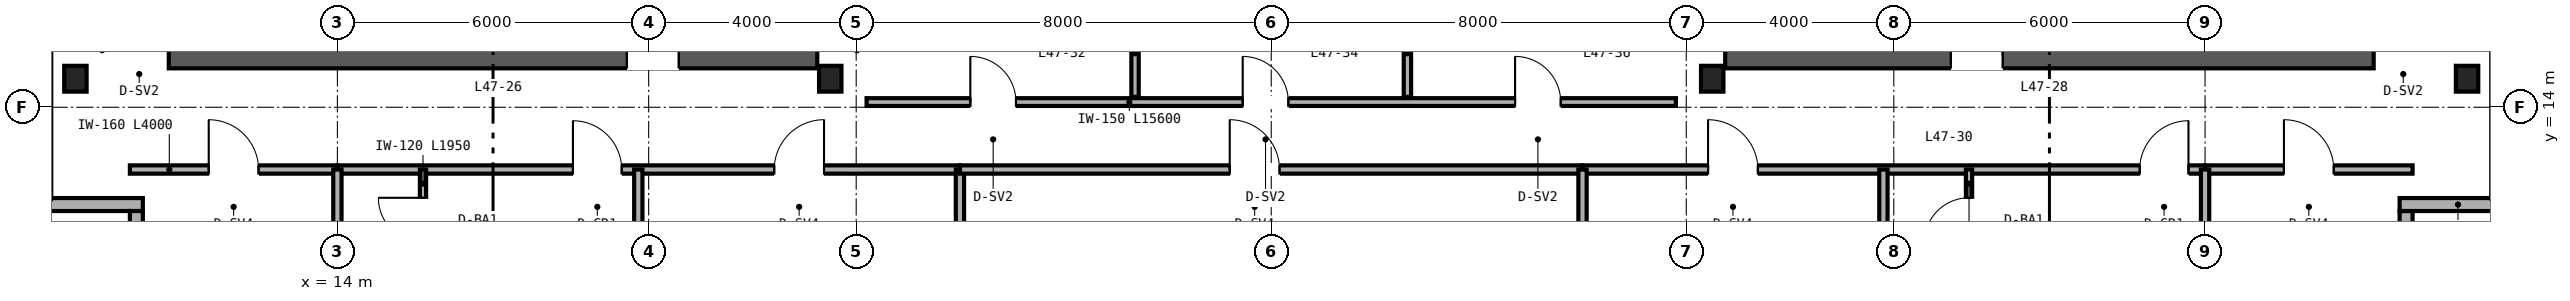
"""IFC4 building model, lengths in metres.
Left out: names, types, materials, properties, quantities, classifications, styles, units other than length and angle.
Written with IfcOpenShell. Run it as: python <this file> out.ifc"""

import sys

from ifc_helpers import new_model, si_unit, direction, frame, frame_2d, origin, origin_2d, place, context, subcontext, project, spatial, rectangle, i_section, extrude, source, transform, mapped, element, fill, save


model = new_model("IFC4")
c1 = context("Model", 3, precision=1e-05, world=origin(), true_north=direction((0.0, 1.0)))
c2 = subcontext(c1, "Body", "Model", "MODEL_VIEW")
j1 = project(units=[si_unit("LENGTHUNIT", "METRE"), si_unit("PLANEANGLEUNIT", "RADIAN")], contexts=[c1])
p1 = place(None, origin())
s1 = spatial("IfcSite", under=j1, at=p1, CompositionType="ELEMENT")
p2 = place(p1, origin())
s2 = spatial("IfcBuilding", under=s1, at=p2, CompositionType="ELEMENT")
p3 = place(p2, frame((0.0, 0.0, 188.4)))
s3 = spatial("IfcBuildingStorey", under=s2, at=p3, CompositionType="ELEMENT", Elevation=188.4)
p4 = place(p3, frame((10.75, 15.0, 0.0), z_axis=(0.0, 0.0, 1.0), x_axis=(1.0, 0.0, 0.0)))
e1 = element("IfcWall", 1, at=p4, inside=s3, PredefinedType="SHEAR", context=c2, shape_type="SweptSolid", body=[
    extrude(rectangle(XDim=12.5, YDim=0.5, at=frame_2d((6.25, 0.0))), origin(), (0.0, 0.0, 1.0), 3.37),
])
p5 = place(p4, frame((8.83, 0.0, 0.0)))
e2 = element("IfcOpeningElement", 2, at=p5, cuts=e1, PredefinedType="OPENING", context=c2, shape_type="SweptSolid", body=[
    extrude(rectangle(XDim=1.0, YDim=2.15, at=frame_2d((0.5, 1.075))), frame((0.0, 0.26, 0.0), z_axis=(0.0, -1.0, 0.0), x_axis=(1.0, 0.0, 0.0)), (0.0, 0.0, 1.0), 0.52),
])
p6 = place(p3, frame((40.75, 15.0, 0.0), z_axis=(0.0, 0.0, 1.0), x_axis=(1.0, 0.0, 0.0)))
e3 = element("IfcWall", 3, at=p6, inside=s3, PredefinedType="SHEAR", context=c2, shape_type="SweptSolid", body=[
    extrude(rectangle(XDim=12.5, YDim=0.5, at=frame_2d((6.25, 0.0))), origin(), (0.0, 0.0, 1.0), 3.37),
])
p7 = place(p6, frame((4.35, 0.0, 0.0)))
e4 = element("IfcOpeningElement", 4, at=p7, cuts=e3, PredefinedType="OPENING", context=c2, shape_type="SweptSolid", body=[
    extrude(rectangle(XDim=1.0, YDim=2.15, at=frame_2d((0.5, 1.075))), frame((0.0, 0.26, 0.0), z_axis=(0.0, -1.0, 0.0), x_axis=(1.0, 0.0, 0.0)), (0.0, 0.0, 1.0), 0.52),
])
m1 = source(origin(), c2, "Body", "SweptSolid", [
    extrude(i_section(OverallWidth=0.432, OverallDepth=0.498, WebThickness=0.056, FlangeThickness=0.089, FilletRadius=0.025, at=origin_2d()), origin(), (0.0, 0.0, 1.0), 3.37),
])
for number, where, z_axis, x_axis in (
    (5, (8.95, 14.55, 0.0), (0.0, 0.0, 1.0), (1.0, 0.0, 0.0)),
    (6, (23.5, 14.55, 0.0), (0.0, 0.0, 1.0), (1.0, 0.0, 0.0)),
    (7, (40.5, 14.55, 0.0), (0.0, 0.0, 1.0), (1.0, 0.0, 0.0)),
    (8, (55.05, 14.55, 0.0), (0.0, 0.0, 1.0), (1.0, 0.0, 0.0)),
):
    element("IfcColumn", number, at=place(p3, frame(where, z_axis=z_axis, x_axis=x_axis)), inside=s3, PredefinedType="COLUMN", context=c2, shape_type="MappedRepresentation", body=[
        mapped(m1, transform((0.0, 0.0, 0.0), scale=1.0)),
    ])
p8 = place(p3, frame((53.875, 10.0, 0.0), z_axis=(0.0, 0.0, 1.0), x_axis=(0.0, 1.0, 0.0)))
e9 = element("IfcWall", 9, at=p8, inside=s3, PredefinedType="SOLIDWALL", context=c2, shape_type="SweptSolid", body=[
    extrude(rectangle(XDim=2.0, YDim=0.25, at=frame_2d((1.0, 0.0))), origin(), (0.0, 0.0, 1.0), 3.37),
])
for number, where, z_axis, x_axis in (
    (10, (53.75, 12.125, 0.0), (0.0, 0.0, 1.0), (1.0, 0.0, 0.0)),
    (11, (8.0, 12.125, 0.0), (0.0, 0.0, 1.0), (1.0, 0.0, 0.0)),
):
    element("IfcWall", number, at=place(p3, frame(where, z_axis=z_axis, x_axis=x_axis)), inside=s3, PredefinedType="SOLIDWALL", context=c2, shape_type="SweptSolid", body=[
        extrude(rectangle(XDim=2.25, YDim=0.25, at=frame_2d((1.125, 0.0))), origin(), (0.0, 0.0, 1.0), 3.37),
    ])
p9 = place(p3, frame((10.125, 12.0, 0.0), z_axis=(0.0, 0.0, 1.0), x_axis=(0.0, -1.0, 0.0)))
e12 = element("IfcWall", 12, at=p9, inside=s3, PredefinedType="SOLIDWALL", context=c2, shape_type="SweptSolid", body=[
    extrude(rectangle(XDim=2.0, YDim=0.25, at=frame_2d((1.0, 0.0))), origin(), (0.0, 0.0, 1.0), 3.37),
])
p10 = place(p3, frame((24.2, 14.1, 0.0), z_axis=(0.0, 0.0, 1.0), x_axis=(1.0, 0.0, 0.0)))
e13 = element("IfcWall", 13, at=p10, inside=s3, PredefinedType="PARTITIONING", context=c2, shape_type="SweptSolid", body=[
    extrude(rectangle(XDim=15.6, YDim=0.15, at=frame_2d((7.8, 0.0))), origin(), (0.0, 0.0, 1.0), 3.37),
])
p11 = place(p10, frame((2.0, 0.0, 0.0)))
e14 = element("IfcOpeningElement", 14, at=p11, cuts=e13, PredefinedType="OPENING", context=c2, shape_type="SweptSolid", body=[
    extrude(rectangle(XDim=0.88, YDim=2.15, at=frame_2d((0.44, 1.075))), frame((0.0, 0.085, 0.0), z_axis=(0.0, -1.0, 0.0), x_axis=(1.0, 0.0, 0.0)), (0.0, 0.0, 1.0), 0.17),
])
p12 = place(p10, frame((7.25, 0.0, 0.0)))
e15 = element("IfcOpeningElement", 15, at=p12, cuts=e13, PredefinedType="OPENING", context=c2, shape_type="SweptSolid", body=[
    extrude(rectangle(XDim=0.88, YDim=2.15, at=frame_2d((0.44, 1.075))), frame((0.0, 0.085, 0.0), z_axis=(0.0, -1.0, 0.0), x_axis=(1.0, 0.0, 0.0)), (0.0, 0.0, 1.0), 0.17),
])
p13 = place(p10, frame((12.5, 0.0, 0.0)))
e16 = element("IfcOpeningElement", 16, at=p13, cuts=e13, PredefinedType="OPENING", context=c2, shape_type="SweptSolid", body=[
    extrude(rectangle(XDim=0.88, YDim=2.15, at=frame_2d((0.44, 1.075))), frame((0.0, 0.085, 0.0), z_axis=(0.0, -1.0, 0.0), x_axis=(1.0, 0.0, 0.0)), (0.0, 0.0, 1.0), 0.17),
])
for number, where, z_axis, x_axis in (
    (17, (29.375, 14.2, 0.0), (0.0, 0.0, 1.0), (0.0, 1.0, 0.0)),
    (18, (34.625, 14.2, 0.0), (0.0, 0.0, 1.0), (0.0, 1.0, 0.0)),
):
    element("IfcWall", number, at=place(p3, frame(where, z_axis=z_axis, x_axis=x_axis)), inside=s3, PredefinedType="PARTITIONING", context=c2, shape_type="SweptSolid", body=[
        extrude(rectangle(XDim=1.68, YDim=0.142, at=frame_2d((0.84, 0.0))), origin(), (0.0, 0.0, 1.0), 3.37),
    ])
p14 = place(p3, frame((10.0, 12.8, 0.0), z_axis=(0.0, 0.0, 1.0), x_axis=(1.0, 0.0, 0.0)))
e19 = element("IfcWall", 19, at=p14, inside=s3, PredefinedType="PARTITIONING", context=c2, shape_type="SweptSolid", body=[
    extrude(rectangle(XDim=4.0, YDim=0.16, at=frame_2d((2.0, 0.0))), origin(), (0.0, 0.0, 1.0), 3.37),
])
p15 = place(p14, frame((1.52, 0.0, 0.0)))
e20 = element("IfcOpeningElement", 20, at=p15, cuts=e19, PredefinedType="OPENING", context=c2, shape_type="SweptSolid", body=[
    extrude(rectangle(XDim=0.96, YDim=2.15, at=frame_2d((0.48, 1.075))), frame((0.0, 0.09, 0.0), z_axis=(0.0, -1.0, 0.0), x_axis=(1.0, 0.0, 0.0)), (0.0, 0.0, 1.0), 0.18),
])
p16 = place(p3, frame((50.0, 12.8, 0.0), z_axis=(0.0, 0.0, 1.0), x_axis=(1.0, 0.0, 0.0)))
e21 = element("IfcWall", 21, at=p16, inside=s3, PredefinedType="PARTITIONING", context=c2, shape_type="SweptSolid", body=[
    extrude(rectangle(XDim=4.0, YDim=0.16, at=frame_2d((2.0, 0.0))), origin(), (0.0, 0.0, 1.0), 3.37),
])
p17 = place(p16, frame((1.52, 0.0, 0.0)))
e22 = element("IfcOpeningElement", 22, at=p17, cuts=e21, PredefinedType="OPENING", context=c2, shape_type="SweptSolid", body=[
    extrude(rectangle(XDim=0.96, YDim=2.15, at=frame_2d((0.48, 1.075))), frame((0.0, 0.09, 0.0), z_axis=(0.0, -1.0, 0.0), x_axis=(1.0, 0.0, 0.0)), (0.0, 0.0, 1.0), 0.18),
])
p18 = place(p3, frame((14.0, 12.8, 0.0), z_axis=(0.0, 0.0, 1.0), x_axis=(1.0, 0.0, 0.0)))
e23 = element("IfcWall", 23, at=p18, inside=s3, PredefinedType="PARTITIONING", context=c2, shape_type="SweptSolid", body=[
    extrude(rectangle(XDim=12.0, YDim=0.16, at=frame_2d((6.0, 0.0))), origin(), (0.0, 0.0, 1.0), 2.913),
])
p19 = place(p18, frame((4.54, 0.0, 0.0)))
e24 = element("IfcOpeningElement", 24, at=p19, cuts=e23, PredefinedType="OPENING", context=c2, shape_type="SweptSolid", body=[
    extrude(rectangle(XDim=0.94, YDim=2.15, at=frame_2d((0.47, 1.075))), frame((0.0, 0.09, 0.0), z_axis=(0.0, -1.0, 0.0), x_axis=(1.0, 0.0, 0.0)), (0.0, 0.0, 1.0), 0.18),
])
p20 = place(p18, frame((8.42, 0.0, 0.0)))
e25 = element("IfcOpeningElement", 25, at=p20, cuts=e23, PredefinedType="OPENING", context=c2, shape_type="SweptSolid", body=[
    extrude(rectangle(XDim=0.96, YDim=2.15, at=frame_2d((0.48, 1.075))), frame((0.0, 0.09, 0.0), z_axis=(0.0, -1.0, 0.0), x_axis=(1.0, 0.0, 0.0)), (0.0, 0.0, 1.0), 0.18),
])
p21 = place(p3, frame((14.0, 6.36, 0.0), z_axis=(0.0, 0.0, 1.0), x_axis=(0.0, 1.0, 0.0)))
e26 = element("IfcWall", 26, at=p21, inside=s3, PredefinedType="PARTITIONING", context=c2, shape_type="SweptSolid", body=[
    extrude(rectangle(XDim=6.44, YDim=0.16, at=frame_2d((3.22, 0.0))), origin(), (0.0, 0.0, 1.0), 2.677),
])
p22 = place(p3, frame((26.0, 6.36, 0.0), z_axis=(0.0, 0.0, 1.0), x_axis=(0.0, 1.0, 0.0)))
e27 = element("IfcWall", 27, at=p22, inside=s3, PredefinedType="PARTITIONING", context=c2, shape_type="SweptSolid", body=[
    extrude(rectangle(XDim=6.44, YDim=0.16, at=frame_2d((3.22, 0.0))), origin(), (0.0, 0.0, 1.0), 2.443),
])
p23 = place(p3, frame((19.8, 6.36, 0.0), z_axis=(0.0, 0.0, 1.0), x_axis=(0.0, 1.0, 0.0)))
e28 = element("IfcWall", 28, at=p23, inside=s3, PredefinedType="PARTITIONING", context=c2, shape_type="SweptSolid", body=[
    extrude(rectangle(XDim=6.44, YDim=0.16, at=frame_2d((3.22, 0.0))), origin(), (0.0, 0.0, 1.0), 2.677),
])
p24 = place(p3, frame((15.65, 10.85, 0.0), z_axis=(0.0, 0.0, 1.0), x_axis=(0.0, 1.0, 0.0)))
e29 = element("IfcWall", 29, at=p24, inside=s3, PredefinedType="PARTITIONING", context=c2, shape_type="SweptSolid", body=[
    extrude(rectangle(XDim=1.95, YDim=0.12, at=frame_2d((0.975, 0.0))), origin(), (0.0, 0.0, 1.0), 3.37),
])
p25 = place(p24, frame((0.545, 0.0, 0.0)))
e30 = element("IfcOpeningElement", 30, at=p25, cuts=e29, PredefinedType="OPENING", context=c2, shape_type="SweptSolid", body=[
    extrude(rectangle(XDim=0.86, YDim=2.1, at=frame_2d((0.43, 1.05))), frame((0.0, 0.07, 0.0), z_axis=(0.0, -1.0, 0.0), x_axis=(1.0, 0.0, 0.0)), (0.0, 0.0, 1.0), 0.14),
])
p26 = place(p3, frame((26.0, 12.8, 0.0), z_axis=(0.0, 0.0, 1.0), x_axis=(1.0, 0.0, 0.0)))
e31 = element("IfcWall", 31, at=p26, inside=s3, PredefinedType="PARTITIONING", context=c2, shape_type="SweptSolid", body=[
    extrude(rectangle(XDim=12.0, YDim=0.16, at=frame_2d((6.0, 0.0))), origin(), (0.0, 0.0, 1.0), 3.37),
])
p27 = place(p26, frame((5.2, 0.0, 0.0)))
e32 = element("IfcOpeningElement", 32, at=p27, cuts=e31, PredefinedType="OPENING", context=c2, shape_type="SweptSolid", body=[
    extrude(rectangle(XDim=0.96, YDim=2.15, at=frame_2d((0.48, 1.075))), frame((0.0, 0.09, 0.0), z_axis=(0.0, -1.0, 0.0), x_axis=(1.0, 0.0, 0.0)), (0.0, 0.0, 1.0), 0.18),
])
p28 = place(p3, frame((38.0, 12.8, 0.0), z_axis=(0.0, 0.0, 1.0), x_axis=(1.0, 0.0, 0.0)))
e33 = element("IfcWall", 33, at=p28, inside=s3, PredefinedType="PARTITIONING", context=c2, shape_type="SweptSolid", body=[
    extrude(rectangle(XDim=12.0, YDim=0.16, at=frame_2d((6.0, 0.0))), origin(), (0.0, 0.0, 1.0), 2.913),
])
p29 = place(p28, frame((2.42, 0.0, 0.0)))
e34 = element("IfcOpeningElement", 34, at=p29, cuts=e33, PredefinedType="OPENING", context=c2, shape_type="SweptSolid", body=[
    extrude(rectangle(XDim=0.96, YDim=2.15, at=frame_2d((0.48, 1.075))), frame((0.0, 0.09, 0.0), z_axis=(0.0, -1.0, 0.0), x_axis=(1.0, 0.0, 0.0)), (0.0, 0.0, 1.0), 0.18),
])
p30 = place(p28, frame((10.74, 0.0, 0.0)))
e35 = element("IfcOpeningElement", 35, at=p30, cuts=e33, PredefinedType="OPENING", context=c2, shape_type="SweptSolid", body=[
    extrude(rectangle(XDim=0.94, YDim=2.15, at=frame_2d((0.47, 1.075))), frame((0.0, 0.09, 0.0), z_axis=(0.0, -1.0, 0.0), x_axis=(1.0, 0.0, 0.0)), (0.0, 0.0, 1.0), 0.18),
])
p31 = place(p3, frame((38.0, 6.36, 0.0), z_axis=(0.0, 0.0, 1.0), x_axis=(0.0, 1.0, 0.0)))
e36 = element("IfcWall", 36, at=p31, inside=s3, PredefinedType="PARTITIONING", context=c2, shape_type="SweptSolid", body=[
    extrude(rectangle(XDim=6.44, YDim=0.16, at=frame_2d((3.22, 0.0))), origin(), (0.0, 0.0, 1.0), 2.443),
])
for number, where, z_axis, x_axis in (
    (37, (50.0, 6.36, 0.0), (0.0, 0.0, 1.0), (0.0, 1.0, 0.0)),
    (38, (43.8, 6.36, 0.0), (0.0, 0.0, 1.0), (0.0, 1.0, 0.0)),
):
    element("IfcWall", number, at=place(p3, frame(where, z_axis=z_axis, x_axis=x_axis)), inside=s3, PredefinedType="PARTITIONING", context=c2, shape_type="SweptSolid", body=[
        extrude(rectangle(XDim=6.44, YDim=0.16, at=frame_2d((3.22, 0.0))), origin(), (0.0, 0.0, 1.0), 2.677),
    ])
p32 = place(p3, frame((45.45, 10.85, 0.0), z_axis=(0.0, 0.0, 1.0), x_axis=(0.0, 1.0, 0.0)))
e39 = element("IfcWall", 39, at=p32, inside=s3, PredefinedType="PARTITIONING", context=c2, shape_type="SweptSolid", body=[
    extrude(rectangle(XDim=1.95, YDim=0.12, at=frame_2d((0.975, 0.0))), origin(), (0.0, 0.0, 1.0), 3.37),
])
p33 = place(p32, frame((0.545, 0.0, 0.0)))
e40 = element("IfcOpeningElement", 40, at=p33, cuts=e39, PredefinedType="OPENING", context=c2, shape_type="SweptSolid", body=[
    extrude(rectangle(XDim=0.86, YDim=2.1, at=frame_2d((0.43, 1.05))), frame((0.0, 0.07, 0.0), z_axis=(0.0, -1.0, 0.0), x_axis=(1.0, 0.0, 0.0)), (0.0, 0.0, 1.0), 0.14),
])
m2 = source(origin(), c2, "Body", "SweptSolid", [
    extrude(rectangle(XDim=1.0, YDim=2.15, at=frame_2d((0.5, 1.075))), frame((0.0, 0.025, 0.0), z_axis=(0.0, -1.0, 0.0), x_axis=(1.0, 0.0, 0.0)), (0.0, 0.0, 1.0), 0.05),
])
p34 = place(p5, origin())
e41 = element("IfcDoor", 41, at=p34, inside=s3, OperationType="SINGLE_SWING_LEFT", PredefinedType="DOOR", context=c2, shape_type="MappedRepresentation", body=[
    mapped(m2, transform((0.0, 0.0, 0.0), scale=1.0)),
])
fill(e2, e41)
p35 = place(p7, origin())
e42 = element("IfcDoor", 42, at=p35, inside=s3, OperationType="SINGLE_SWING_RIGHT", PredefinedType="DOOR", context=c2, shape_type="MappedRepresentation", body=[
    mapped(m2, transform((0.0, 0.0, 0.0), scale=1.0)),
])
fill(e4, e42)
m3 = source(origin(), c2, "Body", "SweptSolid", [
    extrude(rectangle(XDim=0.88, YDim=2.15, at=frame_2d((0.44, 1.075))), frame((0.0, 0.025, 0.0), z_axis=(0.0, -1.0, 0.0), x_axis=(1.0, 0.0, 0.0)), (0.0, 0.0, 1.0), 0.05),
])
p36 = place(p11, origin())
e43 = element("IfcDoor", 43, at=p36, inside=s3, OperationType="SINGLE_SWING_LEFT", PredefinedType="DOOR", context=c2, shape_type="MappedRepresentation", body=[
    mapped(m3, transform((0.0, 0.0, 0.0), scale=1.0)),
])
fill(e14, e43)
p37 = place(p12, origin())
e44 = element("IfcDoor", 44, at=p37, inside=s3, OperationType="SINGLE_SWING_LEFT", PredefinedType="DOOR", context=c2, shape_type="MappedRepresentation", body=[
    mapped(m3, transform((0.0, 0.0, 0.0), scale=1.0)),
])
fill(e15, e44)
p38 = place(p13, origin())
e45 = element("IfcDoor", 45, at=p38, inside=s3, OperationType="SINGLE_SWING_LEFT", PredefinedType="DOOR", context=c2, shape_type="MappedRepresentation", body=[
    mapped(m3, transform((0.0, 0.0, 0.0), scale=1.0)),
])
fill(e16, e45)
m4 = source(origin(), c2, "Body", "SweptSolid", [
    extrude(rectangle(XDim=0.96, YDim=2.15, at=frame_2d((0.48, 1.075))), frame((0.0, 0.025, 0.0), z_axis=(0.0, -1.0, 0.0), x_axis=(1.0, 0.0, 0.0)), (0.0, 0.0, 1.0), 0.05),
])
p39 = place(p15, origin())
e46 = element("IfcDoor", 46, at=p39, inside=s3, OperationType="SINGLE_SWING_LEFT", PredefinedType="DOOR", context=c2, shape_type="MappedRepresentation", body=[
    mapped(m4, transform((0.0, 0.0, 0.0), scale=1.0)),
])
fill(e20, e46)
p40 = place(p17, origin())
e47 = element("IfcDoor", 47, at=p40, inside=s3, OperationType="SINGLE_SWING_LEFT", PredefinedType="DOOR", context=c2, shape_type="MappedRepresentation", body=[
    mapped(m4, transform((0.0, 0.0, 0.0), scale=1.0)),
])
fill(e22, e47)
m5 = source(origin(), c2, "Body", "SweptSolid", [
    extrude(rectangle(XDim=0.86, YDim=2.1, at=frame_2d((0.43, 1.05))), frame((0.0, 0.025, 0.0), z_axis=(0.0, -1.0, 0.0), x_axis=(1.0, 0.0, 0.0)), (0.0, 0.0, 1.0), 0.05),
])
p41 = place(p25, origin())
e48 = element("IfcDoor", 48, at=p41, inside=s3, OperationType="SINGLE_SWING_RIGHT", PredefinedType="DOOR", context=c2, shape_type="MappedRepresentation", body=[
    mapped(m5, transform((0.0, 0.0, 0.0), scale=1.0)),
])
fill(e30, e48)
m6 = source(origin(), c2, "Body", "SweptSolid", [
    extrude(rectangle(XDim=0.94, YDim=2.15, at=frame_2d((0.47, 1.075))), frame((0.0, 0.025, 0.0), z_axis=(0.0, -1.0, 0.0), x_axis=(1.0, 0.0, 0.0)), (0.0, 0.0, 1.0), 0.05),
])
p42 = place(p19, origin())
e49 = element("IfcDoor", 49, at=p42, inside=s3, OperationType="SINGLE_SWING_LEFT", PredefinedType="DOOR", context=c2, shape_type="MappedRepresentation", body=[
    mapped(m6, transform((0.0, 0.0, 0.0), scale=1.0)),
])
fill(e24, e49)
p43 = place(p20, origin())
e50 = element("IfcDoor", 50, at=p43, inside=s3, OperationType="SINGLE_SWING_RIGHT", PredefinedType="DOOR", context=c2, shape_type="MappedRepresentation", body=[
    mapped(m4, transform((0.0, 0.0, 0.0), scale=1.0)),
])
fill(e25, e50)
p44 = place(p27, origin())
e51 = element("IfcDoor", 51, at=p44, inside=s3, OperationType="SINGLE_SWING_LEFT", PredefinedType="DOOR", context=c2, shape_type="MappedRepresentation", body=[
    mapped(m4, transform((0.0, 0.0, 0.0), scale=1.0)),
])
fill(e32, e51)
p45 = place(p33, origin())
e52 = element("IfcDoor", 52, at=p45, inside=s3, OperationType="SINGLE_SWING_LEFT", PredefinedType="DOOR", context=c2, shape_type="MappedRepresentation", body=[
    mapped(m5, transform((0.0, 0.0, 0.0), scale=1.0)),
])
fill(e40, e52)
p46 = place(p29, origin())
e53 = element("IfcDoor", 53, at=p46, inside=s3, OperationType="SINGLE_SWING_LEFT", PredefinedType="DOOR", context=c2, shape_type="MappedRepresentation", body=[
    mapped(m4, transform((0.0, 0.0, 0.0), scale=1.0)),
])
fill(e34, e53)
p47 = place(p30, origin())
e54 = element("IfcDoor", 54, at=p47, inside=s3, OperationType="SINGLE_SWING_RIGHT", PredefinedType="DOOR", context=c2, shape_type="MappedRepresentation", body=[
    mapped(m6, transform((0.0, 0.0, 0.0), scale=1.0)),
])
fill(e35, e54)
save(model, sys.argv[1])
